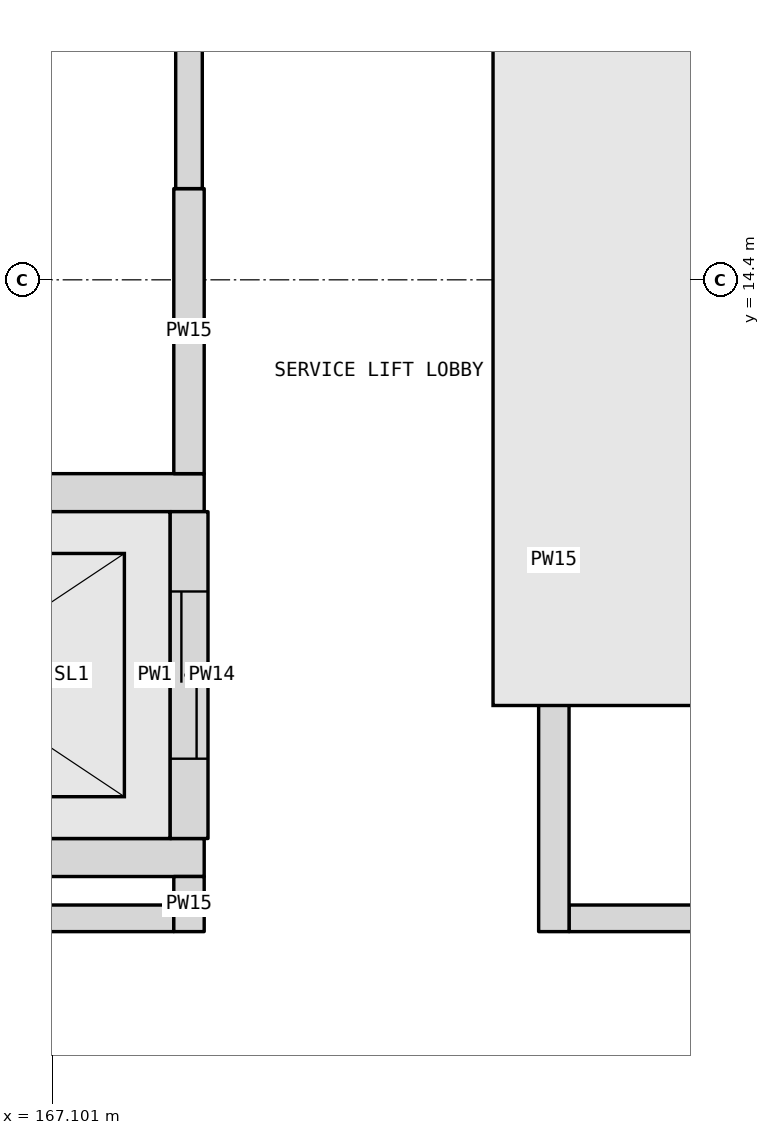
"""IFC4 building model, lengths in metres.
Left out: names, types, materials, properties, quantities, classifications, styles, units other than length and angle.
Written with IfcOpenShell. Run it as: python <this file> out.ifc"""

import sys

from ifc_helpers import new_model, si_unit, direction, frame, frame_2d, origin, place, context, subcontext, project, spatial, rectangle, extrude, element, fill, save


model = new_model("IFC4")
c1 = context("Model", 3, precision=1e-05, world=origin(), true_north=direction((0.0, 1.0)))
c2 = subcontext(c1, "Body", "Model", "MODEL_VIEW")
j1 = project(units=[si_unit("LENGTHUNIT", "METRE"), si_unit("PLANEANGLEUNIT", "RADIAN")], contexts=[c1])
p1 = place(None, origin())
s1 = spatial("IfcSite", under=j1, at=p1, CompositionType="ELEMENT")
p2 = place(p1, origin())
s2 = spatial("IfcBuilding", under=s1, at=p2, CompositionType="ELEMENT")
p3 = place(p2, origin())
s3 = spatial("IfcBuildingStorey", under=s2, at=p3, CompositionType="ELEMENT", Elevation=0.0)
for number, where, z_axis, x_axis in (
    (1, (165.125, 10.825, -1.2), (0.0, 0.0, 1.0), (1.0, 0.0, 0.0)),
    (2, (165.125, 12.775, -1.2), (0.0, 0.0, 1.0), (1.0, 0.0, 0.0)),
):
    element("IfcWall", number, at=place(p3, frame(where, z_axis=z_axis, x_axis=x_axis)), inside=s3, PredefinedType="SOLIDWALL", context=c2, shape_type="SweptSolid", body=[
        extrude(rectangle(XDim=2.75, YDim=0.2, at=frame_2d((1.375, 0.0))), origin(), (0.0, 0.0, 1.0), 1.2),
    ])
p4 = place(p3, frame((167.775, 10.925, -1.2), z_axis=(0.0, 0.0, 1.0), x_axis=(0.0, 1.0, 0.0)))
e3 = element("IfcWall", 3, at=p4, inside=s3, PredefinedType="SOLIDWALL", context=c2, shape_type="SweptSolid", body=[
    extrude(rectangle(XDim=1.75, YDim=0.2, at=frame_2d((0.875, 0.0))), origin(), (0.0, 0.0, 1.0), 1.2),
])
p5 = place(p3, frame((156.075, 10.2, 0.0), z_axis=(0.0, 0.0, 1.0), x_axis=(1.0, 0.0, 0.0)))
e4 = element("IfcWall", 4, at=p5, inside=s3, PredefinedType="PARTITIONING", context=c2, shape_type="SweptSolid", body=[
    extrude(rectangle(XDim=11.825, YDim=0.175, at=frame_2d((5.913, 0.0))), origin(), (0.0, 0.0, 1.0), 5.5),
])
p6 = place(p5, frame((5.425, 0.0, 0.0)))
e5 = element("IfcOpeningElement", 5, at=p6, cuts=e4, PredefinedType="OPENING", context=c2, shape_type="SweptSolid", body=[
    extrude(rectangle(XDim=1.0, YDim=2.1, at=frame_2d((0.5, 1.05))), frame((0.0, 0.097, 0.0), z_axis=(0.0, -1.0, 0.0), x_axis=(1.0, 0.0, 0.0)), (0.0, 0.0, 1.0), 0.195),
])
p7 = place(p3, frame((170.5, 10.2, 0.0), z_axis=(0.0, 0.0, 1.0), x_axis=(1.0, 0.0, 0.0)))
e6 = element("IfcWall", 6, at=p7, inside=s3, PredefinedType="PARTITIONING", context=c2, shape_type="SweptSolid", body=[
    extrude(rectangle(XDim=23.75, YDim=0.175, at=frame_2d((11.875, 0.0))), origin(), (0.0, 0.0, 1.0), 5.5),
])
p8 = place(p7, frame((11.15, 0.0, 0.0)))
e7 = element("IfcOpeningElement", 7, at=p8, cuts=e6, PredefinedType="OPENING", context=c2, shape_type="SweptSolid", body=[
    extrude(rectangle(XDim=1.5, YDim=2.1, at=frame_2d((0.75, 1.05))), frame((0.0, 0.097, 0.0), z_axis=(0.0, -1.0, 0.0), x_axis=(1.0, 0.0, 0.0)), (0.0, 0.0, 1.0), 0.195),
])
for number, where, z_axis, x_axis in (
    (8, (164.875, 13.0, 0.0), (0.0, 0.0, 1.0), (1.0, 0.0, 0.0)),
    (9, (164.875, 10.6, 0.0), (0.0, 0.0, 1.0), (1.0, 0.0, 0.0)),
):
    element("IfcWall", number, at=place(p3, frame(where, z_axis=z_axis, x_axis=x_axis)), inside=s3, PredefinedType="SOLIDWALL", context=c2, shape_type="SweptSolid", body=[
        extrude(rectangle(XDim=3.225, YDim=0.25, at=frame_2d((1.613, 0.0))), origin(), (0.0, 0.0, 1.0), 5.5),
    ])
p9 = place(p3, frame((168.0, 10.113, 0.0), z_axis=(0.0, 0.0, 1.0), x_axis=(0.0, 1.0, 0.0)))
e10 = element("IfcWall", 10, at=p9, inside=s3, PredefinedType="PARTITIONING", context=c2, shape_type="SweptSolid", body=[
    extrude(rectangle(XDim=0.363, YDim=0.2, at=frame_2d((0.181, 0.0))), origin(), (0.0, 0.0, 1.0), 5.5),
])
p10 = place(p3, frame((168.0, 10.725, 0.0), z_axis=(0.0, 0.0, 1.0), x_axis=(0.0, 1.0, 0.0)))
e11 = element("IfcWall", 11, at=p10, inside=s3, PredefinedType="SOLIDWALL", context=c2, shape_type="SweptSolid", body=[
    extrude(rectangle(XDim=2.15, YDim=0.25, at=frame_2d((1.075, 0.0))), origin(), (0.0, 0.0, 1.0), 5.5),
])
p11 = place(p10, frame((0.525, 0.0, 0.0)))
e12 = element("IfcOpeningElement", 12, at=p11, cuts=e11, PredefinedType="OPENING", context=c2, shape_type="SweptSolid", body=[
    extrude(rectangle(XDim=1.1, YDim=2.1, at=frame_2d((0.55, 1.05))), frame((0.0, 0.135, 0.0), z_axis=(0.0, -1.0, 0.0), x_axis=(1.0, 0.0, 0.0)), (0.0, 0.0, 1.0), 0.27),
])
p12 = place(p3, frame((168.0, 13.125, 0.0), z_axis=(0.0, 0.0, 1.0), x_axis=(0.0, 1.0, 0.0)))
e13 = element("IfcWall", 13, at=p12, inside=s3, PredefinedType="PARTITIONING", context=c2, shape_type="SweptSolid", body=[
    extrude(rectangle(XDim=1.875, YDim=0.2, at=frame_2d((0.938, 0.0))), origin(), (0.0, 0.0, 1.0), 5.5),
])
p13 = place(p3, frame((168.0, 15.0, 0.0), z_axis=(0.0, 0.0, 1.0), x_axis=(0.0, 1.0, 0.0)))
e14 = element("IfcWall", 14, at=p13, inside=s3, PredefinedType="PARTITIONING", context=c2, shape_type="SweptSolid", body=[
    extrude(rectangle(XDim=4.3, YDim=0.175, at=frame_2d((2.15, 0.0))), origin(), (0.0, 0.0, 1.0), 5.5),
])
p14 = place(p3, frame((170.4, 10.113, 0.0), z_axis=(0.0, 0.0, 1.0), x_axis=(0.0, 1.0, 0.0)))
e15 = element("IfcWall", 15, at=p14, inside=s3, PredefinedType="PARTITIONING", context=c2, shape_type="SweptSolid", body=[
    extrude(rectangle(XDim=4.887, YDim=0.2, at=frame_2d((2.444, 0.0))), origin(), (0.0, 0.0, 1.0), 5.5),
])
p15 = place(p3, frame((170.4, 15.0, 0.0), z_axis=(0.0, 0.0, 1.0), x_axis=(0.0, 1.0, 0.0)))
e16 = element("IfcWall", 16, at=p15, inside=s3, PredefinedType="PARTITIONING", context=c2, shape_type="SweptSolid", body=[
    extrude(rectangle(XDim=51.8, YDim=0.175, at=frame_2d((25.9, 0.0))), origin(), (0.0, 0.0, 1.0), 5.5),
])
p16 = place(p15, frame((11.95, 0.0, 0.0)))
e17 = element("IfcOpeningElement", 17, at=p16, cuts=e16, PredefinedType="OPENING", context=c2, shape_type="SweptSolid", body=[
    extrude(rectangle(XDim=2.1, YDim=2.1, at=frame_2d((1.05, 1.05))), frame((0.0, 0.097, 0.0), z_axis=(0.0, -1.0, 0.0), x_axis=(1.0, 0.0, 0.0)), (0.0, 0.0, 1.0), 0.195),
])
p17 = place(p15, frame((21.95, 0.0, 0.0)))
e18 = element("IfcOpeningElement", 18, at=p17, cuts=e16, PredefinedType="OPENING", context=c2, shape_type="SweptSolid", body=[
    extrude(rectangle(XDim=2.1, YDim=2.1, at=frame_2d((1.05, 1.05))), frame((0.0, 0.097, 0.0), z_axis=(0.0, -1.0, 0.0), x_axis=(1.0, 0.0, 0.0)), (0.0, 0.0, 1.0), 0.195),
])
p18 = place(p15, frame((36.1, 0.0, 0.0)))
e19 = element("IfcOpeningElement", 19, at=p18, cuts=e16, PredefinedType="OPENING", context=c2, shape_type="SweptSolid", body=[
    extrude(rectangle(XDim=1.0, YDim=2.1, at=frame_2d((0.5, 1.05))), frame((0.0, 0.097, 0.0), z_axis=(0.0, -1.0, 0.0), x_axis=(1.0, 0.0, 0.0)), (0.0, 0.0, 1.0), 0.195),
])
p19 = place(p15, frame((43.753, 0.0, 0.0)))
e20 = element("IfcOpeningElement", 20, at=p19, cuts=e16, PredefinedType="OPENING", context=c2, shape_type="SweptSolid", body=[
    extrude(rectangle(XDim=1.0, YDim=2.1, at=frame_2d((0.5, 1.05))), frame((0.0, 0.097, 0.0), z_axis=(0.0, -1.0, 0.0), x_axis=(1.0, 0.0, 0.0)), (0.0, 0.0, 1.0), 0.195),
])
p20 = place(p15, frame((46.853, 0.0, 0.0)))
e21 = element("IfcOpeningElement", 21, at=p20, cuts=e16, PredefinedType="OPENING", context=c2, shape_type="SweptSolid", body=[
    extrude(rectangle(XDim=1.0, YDim=2.1, at=frame_2d((0.5, 1.05))), frame((0.0, 0.097, 0.0), z_axis=(0.0, -1.0, 0.0), x_axis=(1.0, 0.0, 0.0)), (0.0, 0.0, 1.0), 0.195),
])
p21 = place(p15, frame((49.722, 0.0, 0.0)))
e22 = element("IfcOpeningElement", 22, at=p21, cuts=e16, PredefinedType="OPENING", context=c2, shape_type="SweptSolid", body=[
    extrude(rectangle(XDim=1.05, YDim=2.1, at=frame_2d((0.525, 1.05))), frame((0.0, 0.097, 0.0), z_axis=(0.0, -1.0, 0.0), x_axis=(1.0, 0.0, 0.0)), (0.0, 0.0, 1.0), 0.195),
])
p22 = place(p11, origin())
e23 = element("IfcDoor", 23, at=p22, inside=s3, OperationType="DOUBLE_DOOR_SLIDING", PredefinedType="DOOR", context=c2, shape_type="SweptSolid", body=[
    extrude(rectangle(XDim=1.1, YDim=2.1, at=frame_2d((0.55, 1.05))), frame((0.0, 0.025, 0.0), z_axis=(0.0, -1.0, 0.0), x_axis=(1.0, 0.0, 0.0)), (0.0, 0.0, 1.0), 0.05),
])
fill(e12, e23)
save(model, sys.argv[1])
